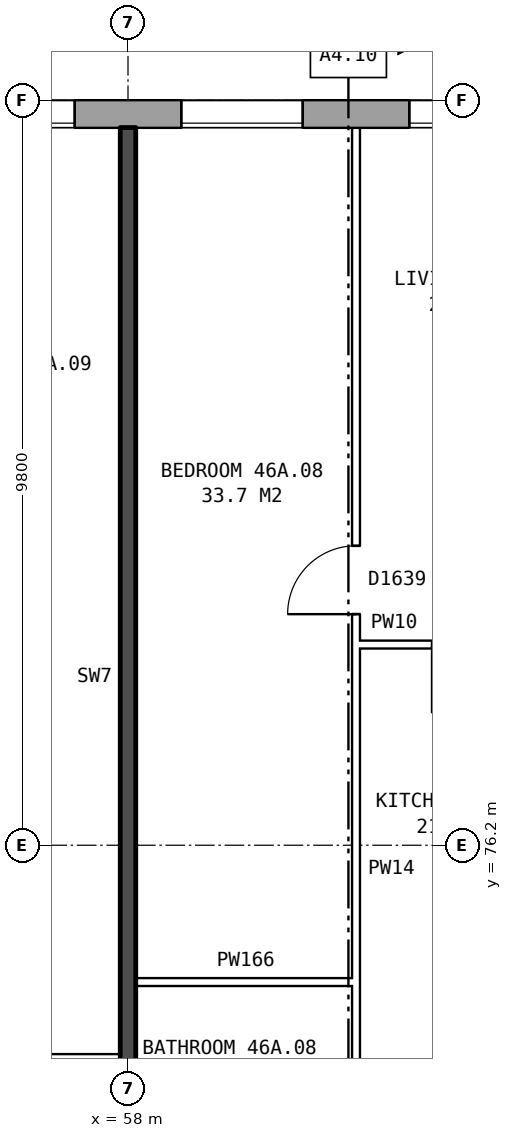
"""IFC4 building model, lengths in metres.
Left out: names, types, materials, properties, quantities, classifications, styles, units other than length and angle.
Written with IfcOpenShell. Run it as: python <this file> out.ifc"""

import sys

from ifc_helpers import new_model, si_unit, direction, frame, frame_2d, origin, place, context, subcontext, project, spatial, rectangle, extrude, element, fill, save


model = new_model("IFC4")
c1 = context("Model", 3, precision=1e-05, world=origin(), true_north=direction((0.0, 1.0)))
c2 = subcontext(c1, "Body", "Model", "MODEL_VIEW")
j1 = project(units=[si_unit("LENGTHUNIT", "METRE"), si_unit("PLANEANGLEUNIT", "RADIAN")], contexts=[c1])
p1 = place(None, origin())
s1 = spatial("IfcSite", under=j1, at=p1, CompositionType="ELEMENT")
p2 = place(p1, origin())
s2 = spatial("IfcBuilding", under=s1, at=p2, CompositionType="ELEMENT")
p3 = place(p2, frame((0.0, 0.0, 164.0)))
s3 = spatial("IfcBuildingStorey", under=s2, at=p3, CompositionType="ELEMENT", Elevation=164.0)
p4 = place(p3, frame((72.925, 85.82, 0.0), z_axis=(0.0, 0.0, 1.0), x_axis=(-1.0, 0.0, 0.0)))
e1 = element("IfcWall", 1, at=p4, inside=s3, PredefinedType="STANDARD", context=c2, shape_type="SweptSolid", body=[
    extrude(rectangle(XDim=41.351, YDim=0.36, at=frame_2d((20.675, 0.0))), origin(), (0.0, 0.0, 1.0), 2.85),
])
p5 = place(p4, frame((0.625, 0.0, 0.8)))
e2 = element("IfcOpeningElement", 2, at=p5, cuts=e1, PredefinedType="OPENING", context=c2, shape_type="SweptSolid", body=[
    extrude(rectangle(XDim=1.6, YDim=1.8, at=frame_2d((0.8, 0.9))), frame((0.0, 0.19, 0.0), z_axis=(0.0, -1.0, 0.0), x_axis=(1.0, 0.0, 0.0)), (0.0, 0.0, 1.0), 0.38),
])
p6 = place(p4, frame((3.625, 0.0, 0.8)))
e3 = element("IfcOpeningElement", 3, at=p6, cuts=e1, PredefinedType="OPENING", context=c2, shape_type="SweptSolid", body=[
    extrude(rectangle(XDim=1.6, YDim=1.8, at=frame_2d((0.8, 0.9))), frame((0.0, 0.19, 0.0), z_axis=(0.0, -1.0, 0.0), x_axis=(1.0, 0.0, 0.0)), (0.0, 0.0, 1.0), 0.38),
])
p7 = place(p4, frame((6.625, 0.0, 0.8)))
e4 = element("IfcOpeningElement", 4, at=p7, cuts=e1, PredefinedType="OPENING", context=c2, shape_type="SweptSolid", body=[
    extrude(rectangle(XDim=1.6, YDim=1.8, at=frame_2d((0.8, 0.9))), frame((0.0, 0.19, 0.0), z_axis=(0.0, -1.0, 0.0), x_axis=(1.0, 0.0, 0.0)), (0.0, 0.0, 1.0), 0.38),
])
p8 = place(p4, frame((9.625, 0.0, 0.8)))
e5 = element("IfcOpeningElement", 5, at=p8, cuts=e1, PredefinedType="OPENING", context=c2, shape_type="SweptSolid", body=[
    extrude(rectangle(XDim=1.6, YDim=1.8, at=frame_2d((0.8, 0.9))), frame((0.0, 0.19, 0.0), z_axis=(0.0, -1.0, 0.0), x_axis=(1.0, 0.0, 0.0)), (0.0, 0.0, 1.0), 0.38),
])
p9 = place(p4, frame((12.625, 0.0, 0.8)))
e6 = element("IfcOpeningElement", 6, at=p9, cuts=e1, PredefinedType="OPENING", context=c2, shape_type="SweptSolid", body=[
    extrude(rectangle(XDim=1.6, YDim=1.8, at=frame_2d((0.8, 0.9))), frame((0.0, 0.19, 0.0), z_axis=(0.0, -1.0, 0.0), x_axis=(1.0, 0.0, 0.0)), (0.0, 0.0, 1.0), 0.38),
])
p10 = place(p4, frame((15.625, 0.0, 0.8)))
e7 = element("IfcOpeningElement", 7, at=p10, cuts=e1, PredefinedType="OPENING", context=c2, shape_type="SweptSolid", body=[
    extrude(rectangle(XDim=1.6, YDim=1.8, at=frame_2d((0.8, 0.9))), frame((0.0, 0.19, 0.0), z_axis=(0.0, -1.0, 0.0), x_axis=(1.0, 0.0, 0.0)), (0.0, 0.0, 1.0), 0.38),
])
p11 = place(p4, frame((18.075, 0.0, 1.65)))
e8 = element("IfcOpeningElement", 8, at=p11, cuts=e1, PredefinedType="OPENING", context=c2, shape_type="SweptSolid", body=[
    extrude(rectangle(XDim=0.6, YDim=0.9, at=frame_2d((0.3, 0.45))), frame((0.0, 0.19, 0.0), z_axis=(0.0, -1.0, 0.0), x_axis=(1.0, 0.0, 0.0)), (0.0, 0.0, 1.0), 0.38),
])
p12 = place(p4, frame((21.125, 0.0, 0.15)))
e9 = element("IfcOpeningElement", 9, at=p12, cuts=e1, PredefinedType="OPENING", context=c2, shape_type="SweptSolid", body=[
    extrude(rectangle(XDim=1.0, YDim=0.9, at=frame_2d((0.5, 0.45))), frame((0.0, 0.19, 0.0), z_axis=(0.0, -1.0, 0.0), x_axis=(1.0, 0.0, 0.0)), (0.0, 0.0, 1.0), 0.38),
])
p13 = place(p4, frame((24.625, 0.0, 0.8)))
e10 = element("IfcOpeningElement", 10, at=p13, cuts=e1, PredefinedType="OPENING", context=c2, shape_type="SweptSolid", body=[
    extrude(rectangle(XDim=1.6, YDim=1.8, at=frame_2d((0.8, 0.9))), frame((0.0, 0.19, 0.0), z_axis=(0.0, -1.0, 0.0), x_axis=(1.0, 0.0, 0.0)), (0.0, 0.0, 1.0), 0.38),
])
p14 = place(p4, frame((27.625, 0.0, 0.8)))
e11 = element("IfcOpeningElement", 11, at=p14, cuts=e1, PredefinedType="OPENING", context=c2, shape_type="SweptSolid", body=[
    extrude(rectangle(XDim=1.6, YDim=1.8, at=frame_2d((0.8, 0.9))), frame((0.0, 0.19, 0.0), z_axis=(0.0, -1.0, 0.0), x_axis=(1.0, 0.0, 0.0)), (0.0, 0.0, 1.0), 0.38),
])
p15 = place(p4, frame((30.625, 0.0, 0.8)))
e12 = element("IfcOpeningElement", 12, at=p15, cuts=e1, PredefinedType="OPENING", context=c2, shape_type="SweptSolid", body=[
    extrude(rectangle(XDim=1.6, YDim=1.8, at=frame_2d((0.8, 0.9))), frame((0.0, 0.19, 0.0), z_axis=(0.0, -1.0, 0.0), x_axis=(1.0, 0.0, 0.0)), (0.0, 0.0, 1.0), 0.38),
])
p16 = place(p4, frame((33.625, 0.0, 0.8)))
e13 = element("IfcOpeningElement", 13, at=p16, cuts=e1, PredefinedType="OPENING", context=c2, shape_type="SweptSolid", body=[
    extrude(rectangle(XDim=1.6, YDim=1.8, at=frame_2d((0.8, 0.9))), frame((0.0, 0.19, 0.0), z_axis=(0.0, -1.0, 0.0), x_axis=(1.0, 0.0, 0.0)), (0.0, 0.0, 1.0), 0.38),
])
p17 = place(p4, frame((36.625, 0.0, 0.8)))
e14 = element("IfcOpeningElement", 14, at=p17, cuts=e1, PredefinedType="OPENING", context=c2, shape_type="SweptSolid", body=[
    extrude(rectangle(XDim=1.6, YDim=1.8, at=frame_2d((0.8, 0.9))), frame((0.0, 0.19, 0.0), z_axis=(0.0, -1.0, 0.0), x_axis=(1.0, 0.0, 0.0)), (0.0, 0.0, 1.0), 0.38),
])
p18 = place(p4, frame((19.225, 0.0, 0.15)))
e15 = element("IfcOpeningElement", 15, at=p18, cuts=e1, PredefinedType="OPENING", context=c2, shape_type="SweptSolid", body=[
    extrude(rectangle(XDim=0.6, YDim=0.9, at=frame_2d((0.3, 0.45))), frame((0.0, 0.19, 0.0), z_axis=(0.0, -1.0, 0.0), x_axis=(1.0, 0.0, 0.0)), (0.0, 0.0, 1.0), 0.38),
])
p19 = place(p4, frame((20.125, 0.0, 0.25)))
e16 = element("IfcOpeningElement", 16, at=p19, cuts=e1, PredefinedType="OPENING", context=c2, shape_type="SweptSolid", body=[
    extrude(rectangle(XDim=0.6, YDim=1.5, at=frame_2d((0.3, 0.75))), frame((0.0, 0.19, 0.0), z_axis=(0.0, -1.0, 0.0), x_axis=(1.0, 0.0, 0.0)), (0.0, 0.0, 1.0), 0.38),
])
p20 = place(p4, frame((22.625, 0.0, 1.65)))
e17 = element("IfcOpeningElement", 17, at=p20, cuts=e1, PredefinedType="OPENING", context=c2, shape_type="SweptSolid", body=[
    extrude(rectangle(XDim=1.0, YDim=0.9, at=frame_2d((0.5, 0.45))), frame((0.0, 0.19, 0.0), z_axis=(0.0, -1.0, 0.0), x_axis=(1.0, 0.0, 0.0)), (0.0, 0.0, 1.0), 0.38),
])
for number, where, z_axis, x_axis in (
    (18, (55.0, 73.4, 0.0), (0.0, 0.0, 1.0), (1.0, 0.0, 0.0)),
    (19, (58.1, 74.4, 0.0), (0.0, 0.0, 1.0), (1.0, 0.0, 0.0)),
):
    element("IfcWall", number, at=place(p3, frame(where, z_axis=z_axis, x_axis=x_axis)), inside=s3, PredefinedType="PARTITIONING", context=c2, shape_type="SweptSolid", body=[
        extrude(rectangle(XDim=2.9, YDim=0.1, at=frame_2d((1.45, 0.0))), origin(), (0.0, 0.0, 1.0), 2.85),
    ])
p21 = place(p3, frame((61.0, 78.84, 0.0), z_axis=(0.0, 0.0, 1.0), x_axis=(1.0, 0.0, 0.0)))
e20 = element("IfcWall", 20, at=p21, inside=s3, PredefinedType="PARTITIONING", context=c2, shape_type="SweptSolid", body=[
    extrude(rectangle(XDim=2.9, YDim=0.1, at=frame_2d((1.45, 0.0))), origin(), (0.0, 0.0, 1.0), 2.85),
])
p22 = place(p21, frame((1.0, 0.0, 0.0)))
e21 = element("IfcOpeningElement", 21, at=p22, cuts=e20, PredefinedType="OPENING", context=c2, shape_type="SweptSolid", body=[
    extrude(rectangle(XDim=0.9, YDim=2.1, at=frame_2d((0.45, 1.05))), frame((0.0, 0.06, 0.0), z_axis=(0.0, -1.0, 0.0), x_axis=(1.0, 0.0, 0.0)), (0.0, 0.0, 1.0), 0.12),
])
p23 = place(p3, frame((58.0, 71.2, 0.0), z_axis=(0.0, 0.0, 1.0), x_axis=(0.0, 1.0, 0.0)))
e22 = element("IfcWall", 22, at=p23, inside=s3, PredefinedType="SOLIDWALL", context=c2, shape_type="SweptSolid", body=[
    extrude(rectangle(XDim=14.44, YDim=0.2, at=frame_2d((7.22, 0.0))), origin(), (0.0, 0.0, 1.0), 2.85),
])
p24 = place(p3, frame((61.0, 71.3, 0.0), z_axis=(0.0, 0.0, 1.0), x_axis=(0.0, 1.0, 0.0)))
e23 = element("IfcWall", 23, at=p24, inside=s3, PredefinedType="PARTITIONING", context=c2, shape_type="SweptSolid", body=[
    extrude(rectangle(XDim=14.34, YDim=0.1, at=frame_2d((7.17, 0.0))), origin(), (0.0, 0.0, 1.0), 2.85),
])
p25 = place(p24, frame((7.94, 0.0, 0.0)))
e24 = element("IfcOpeningElement", 24, at=p25, cuts=e23, PredefinedType="OPENING", context=c2, shape_type="SweptSolid", body=[
    extrude(rectangle(XDim=0.9, YDim=2.1, at=frame_2d((0.45, 1.05))), frame((0.0, 0.06, 0.0), z_axis=(0.0, -1.0, 0.0), x_axis=(1.0, 0.0, 0.0)), (0.0, 0.0, 1.0), 0.12),
])
p26 = place(p24, frame((0.9, 0.0, 0.0)))
e25 = element("IfcOpeningElement", 25, at=p26, cuts=e23, PredefinedType="OPENING", context=c2, shape_type="SweptSolid", body=[
    extrude(rectangle(XDim=0.9, YDim=2.1, at=frame_2d((0.45, 1.05))), frame((0.0, 0.06, 0.0), z_axis=(0.0, -1.0, 0.0), x_axis=(1.0, 0.0, 0.0)), (0.0, 0.0, 1.0), 0.12),
])
p27 = place(p8, origin())
e26 = element("IfcWindow", 26, at=p27, inside=s3, PartitioningType="SINGLE_PANEL", PredefinedType="WINDOW", context=c2, shape_type="SweptSolid", body=[
    extrude(rectangle(XDim=1.6, YDim=1.8, at=frame_2d((0.8, 0.9))), frame((0.0, 0.15, 0.0), z_axis=(0.0, -1.0, 0.0), x_axis=(1.0, 0.0, 0.0)), (0.0, 0.0, 1.0), 0.06),
])
fill(e5, e26)
p28 = place(p9, origin())
e27 = element("IfcWindow", 27, at=p28, inside=s3, PartitioningType="SINGLE_PANEL", PredefinedType="WINDOW", context=c2, shape_type="SweptSolid", body=[
    extrude(rectangle(XDim=1.6, YDim=1.8, at=frame_2d((0.8, 0.9))), frame((0.0, 0.15, 0.0), z_axis=(0.0, -1.0, 0.0), x_axis=(1.0, 0.0, 0.0)), (0.0, 0.0, 1.0), 0.06),
])
fill(e6, e27)
p29 = place(p10, origin())
e28 = element("IfcWindow", 28, at=p29, inside=s3, PartitioningType="SINGLE_PANEL", PredefinedType="WINDOW", context=c2, shape_type="SweptSolid", body=[
    extrude(rectangle(XDim=1.6, YDim=1.8, at=frame_2d((0.8, 0.9))), frame((0.0, 0.15, 0.0), z_axis=(0.0, -1.0, 0.0), x_axis=(1.0, 0.0, 0.0)), (0.0, 0.0, 1.0), 0.06),
])
fill(e7, e28)
p30 = place(p25, origin())
e29 = element("IfcDoor", 29, at=p30, inside=s3, OperationType="SINGLE_SWING_LEFT", PredefinedType="DOOR", context=c2, shape_type="SweptSolid", body=[
    extrude(rectangle(XDim=0.9, YDim=2.1, at=frame_2d((0.45, 1.05))), frame((0.0, 0.025, 0.0), z_axis=(0.0, -1.0, 0.0), x_axis=(1.0, 0.0, 0.0)), (0.0, 0.0, 1.0), 0.05),
])
fill(e24, e29)
save(model, sys.argv[1])
